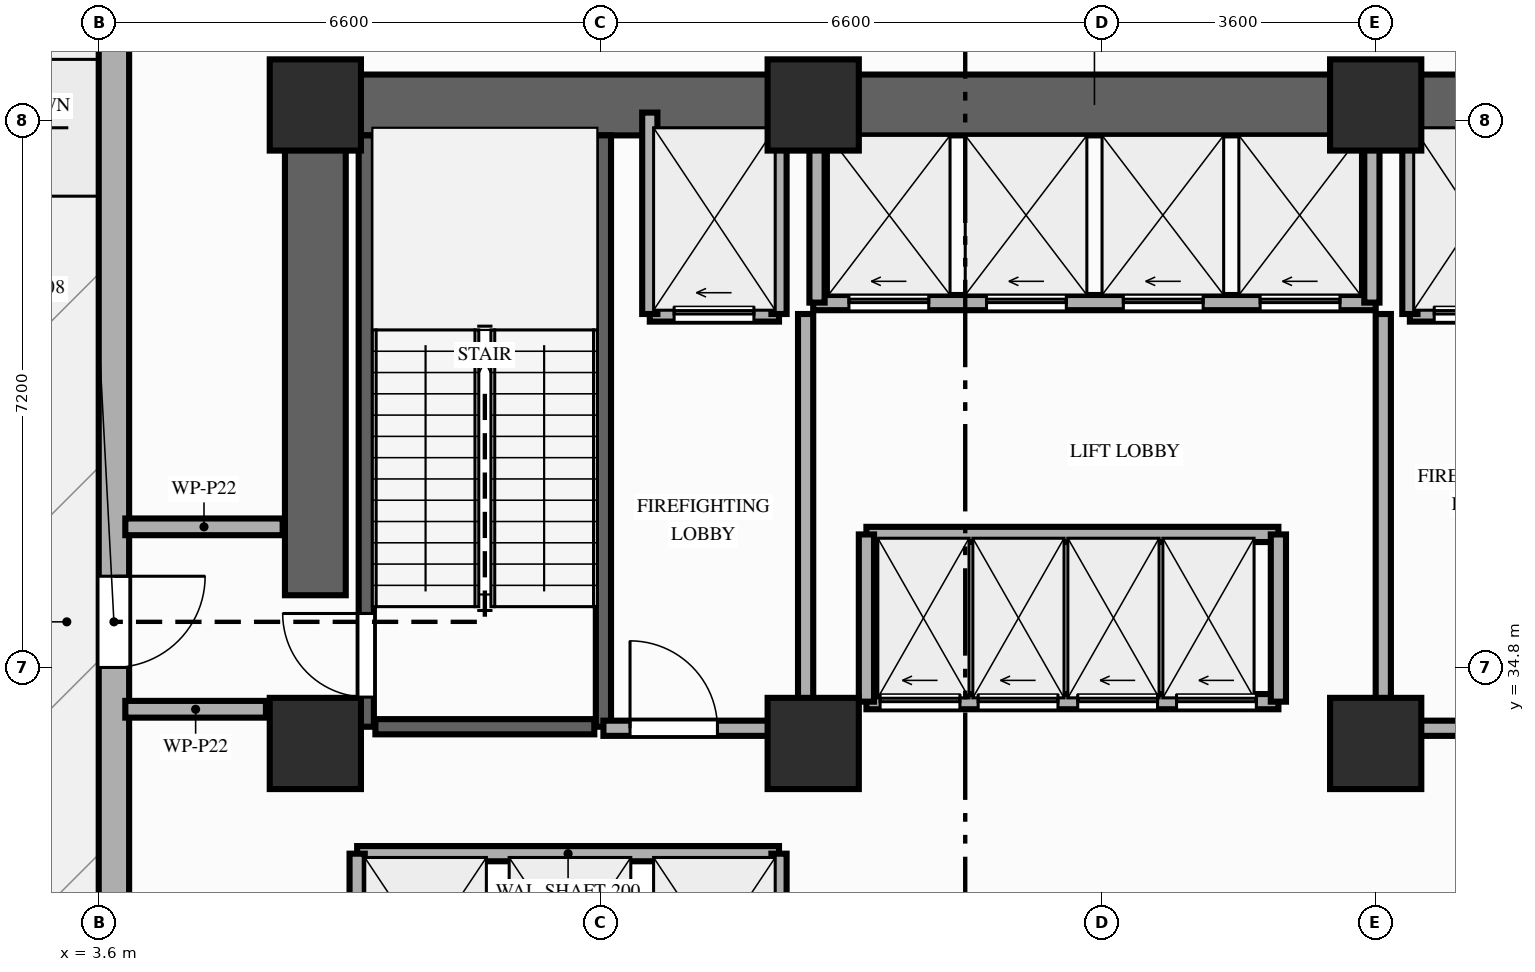
"""IFC4 building model, lengths in metres.
Left out: names, types, materials, properties, quantities, classifications, styles, units other than length and angle.
Written with IfcOpenShell. Run it as: python <this file> out.ifc"""

import sys

from ifc_helpers import new_model, si_unit, direction, frame, frame_2d, origin, origin_2d, place, context, subcontext, project, spatial, rectangle, extrude, element, fill, save


model = new_model("IFC4")
c1 = context("Model", 3, precision=1e-05, world=origin(), true_north=direction((0.0, 1.0)))
c2 = subcontext(c1, "Body", "Model", "MODEL_VIEW")
j1 = project(units=[si_unit("LENGTHUNIT", "METRE"), si_unit("PLANEANGLEUNIT", "RADIAN")], contexts=[c1])
p1 = place(None, origin())
s1 = spatial("IfcSite", under=j1, at=p1, CompositionType="ELEMENT")
p2 = place(p1, origin())
s2 = spatial("IfcBuilding", under=s1, at=p2, CompositionType="ELEMENT")
p3 = place(p2, origin())
s3 = spatial("IfcBuildingStorey", under=s2, at=p3, CompositionType="ELEMENT", Elevation=0.0)
for number, where, z_axis, x_axis in (
    (1, (6.45, 33.8, 0.0), (0.0, 0.0, 1.0), (1.0, 0.0, 0.0)),
    (2, (13.0, 33.8, 0.0), (0.0, 0.0, 1.0), (1.0, 0.0, 0.0)),
    (3, (20.4, 33.8, 0.0), (0.0, 0.0, 1.0), (1.0, 0.0, 0.0)),
    (4, (6.45, 42.2, 0.0), (0.0, 0.0, 1.0), (1.0, 0.0, 0.0)),
    (5, (13.0, 42.2, 0.0), (0.0, 0.0, 1.0), (1.0, 0.0, 0.0)),
    (6, (20.4, 42.2, 0.0), (0.0, 0.0, 1.0), (1.0, 0.0, 0.0)),
):
    element("IfcColumn", number, at=place(p3, frame(where, z_axis=z_axis, x_axis=x_axis)), inside=s3, PredefinedType="COLUMN", context=c2, shape_type="SweptSolid", body=[
        extrude(rectangle(XDim=1.2, YDim=1.2, at=origin_2d()), origin(), (0.0, 0.0, 1.0), 4.6),
    ])
p4 = place(p3, frame((3.8, 48.8, 0.0), z_axis=(0.0, 0.0, 1.0), x_axis=(0.0, -1.0, 0.0)))
e7 = element("IfcWall", 7, at=p4, inside=s3, PredefinedType="STANDARD", context=c2, shape_type="SweptSolid", body=[
    extrude(rectangle(XDim=46.0, YDim=0.4, at=frame_2d((23.0, 0.0))), origin(), (0.0, 0.0, 1.0), 3.83),
])
p5 = place(p4, frame((27.45, 0.0, 0.0)))
e8 = element("IfcOpeningElement", 8, at=p5, cuts=e7, PredefinedType="OPENING", context=c2, shape_type="SweptSolid", body=[
    extrude(rectangle(XDim=2.4, YDim=2.5, at=frame_2d((1.2, 1.25))), frame((0.0, 0.21, 0.0), z_axis=(0.0, -1.0, 0.0), x_axis=(1.0, 0.0, 0.0)), (0.0, 0.0, 1.0), 0.42),
])
p6 = place(p4, frame((33.3, 0.0, 0.0)))
e9 = element("IfcOpeningElement", 9, at=p6, cuts=e7, PredefinedType="OPENING", context=c2, shape_type="SweptSolid", body=[
    extrude(rectangle(XDim=1.2, YDim=2.2, at=frame_2d((0.6, 1.1))), frame((0.0, 0.21, 0.0), z_axis=(0.0, -1.0, 0.0), x_axis=(1.0, 0.0, 0.0)), (0.0, 0.0, 1.0), 0.42),
])
p7 = place(p4, frame((12.8, 0.0, 0.0)))
e10 = element("IfcOpeningElement", 10, at=p7, cuts=e7, PredefinedType="OPENING", context=c2, shape_type="SweptSolid", body=[
    extrude(rectangle(XDim=1.2, YDim=2.2, at=frame_2d((0.6, 1.1))), frame((0.0, 0.21, 0.0), z_axis=(0.0, -1.0, 0.0), x_axis=(1.0, 0.0, 0.0)), (0.0, 0.0, 1.0), 0.42),
])
p8 = place(p3, frame((6.45, 42.2, 0.0), z_axis=(0.0, 0.0, 1.0), x_axis=(1.0, 0.0, 0.0)))
e11 = element("IfcWall", 11, at=p8, inside=s3, PredefinedType="SHEAR", context=c2, shape_type="SweptSolid", body=[
    extrude(rectangle(XDim=20.45, YDim=0.8, at=frame_2d((10.225, 0.0))), origin(), (0.0, 0.0, 1.0), 4.35),
])
p9 = place(p3, frame((6.45, 35.75, 0.0), z_axis=(0.0, 0.0, 1.0), x_axis=(0.0, 1.0, 0.0)))
e12 = element("IfcWall", 12, at=p9, inside=s3, PredefinedType="SHEAR", context=c2, shape_type="SweptSolid", body=[
    extrude(rectangle(XDim=6.0, YDim=0.8, at=frame_2d((3.0, 0.0))), origin(), (0.0, 0.0, 1.0), 4.35),
])
p10 = place(p3, frame((7.12, 34.02, 0.0), z_axis=(0.0, 0.0, 1.0), x_axis=(0.0, 1.0, 0.0)))
e13 = element("IfcWall", 13, at=p10, inside=s3, PredefinedType="SHEAR", context=c2, shape_type="SweptSolid", body=[
    extrude(rectangle(XDim=7.78, YDim=0.2, at=frame_2d((3.89, 0.0))), origin(), (0.0, 0.0, 1.0), 4.35),
])
p11 = place(p10, frame((0.39, 0.0, 0.0)))
e14 = element("IfcOpeningElement", 14, at=p11, cuts=e13, PredefinedType="OPENING", context=c2, shape_type="SweptSolid", body=[
    extrude(rectangle(XDim=1.1, YDim=2.15, at=frame_2d((0.55, 1.075))), frame((0.0, 0.11, 0.0), z_axis=(0.0, -1.0, 0.0), x_axis=(1.0, 0.0, 0.0)), (0.0, 0.0, 1.0), 0.22),
])
p12 = place(p3, frame((10.24, 34.02, 0.0), z_axis=(0.0, 0.0, 1.0), x_axis=(0.0, 1.0, 0.0)))
e15 = element("IfcWall", 15, at=p12, inside=s3, PredefinedType="SHEAR", context=c2, shape_type="SweptSolid", body=[
    extrude(rectangle(XDim=7.78, YDim=0.2, at=frame_2d((3.89, 0.0))), origin(), (0.0, 0.0, 1.0), 4.35),
])
p13 = place(p3, frame((7.24, 34.02, 0.0), z_axis=(0.0, 0.0, 1.0), x_axis=(1.0, 0.0, 0.0)))
e16 = element("IfcWall", 16, at=p13, inside=s3, PredefinedType="SHEAR", context=c2, shape_type="SweptSolid", body=[
    extrude(rectangle(XDim=2.88, YDim=0.2, at=frame_2d((1.44, 0.0))), origin(), (0.0, 0.0, 1.0), 4.35),
])
p14 = place(p3, frame((7.0, 32.35, 0.0), z_axis=(0.0, 0.0, 1.0), x_axis=(1.0, 0.0, 0.0)))
e17 = element("IfcWall", 17, at=p14, inside=s3, PredefinedType="MOVABLE", context=c2, shape_type="SweptSolid", body=[
    extrude(rectangle(XDim=5.55, YDim=0.2, at=frame_2d((2.775, 0.0))), origin(), (0.0, 0.0, 1.0), 4.35),
])
for number, where, z_axis, x_axis in (
    (18, (7.0, 29.85, 0.0), (0.0, 0.0, 1.0), (0.0, 1.0, 0.0)),
    (19, (12.55, 29.85, 0.0), (0.0, 0.0, 1.0), (0.0, 1.0, 0.0)),
):
    element("IfcWall", number, at=place(p3, frame(where, z_axis=z_axis, x_axis=x_axis)), inside=s3, PredefinedType="MOVABLE", context=c2, shape_type="SweptSolid", body=[
        extrude(rectangle(XDim=2.5, YDim=0.2, at=frame_2d((1.25, 0.0))), origin(), (0.0, 0.0, 1.0), 4.35),
    ])
p15 = place(p3, frame((10.85, 39.45, 0.0), z_axis=(0.0, 0.0, 1.0), x_axis=(1.0, 0.0, 0.0)))
e20 = element("IfcWall", 20, at=p15, inside=s3, PredefinedType="MOVABLE", context=c2, shape_type="SweptSolid", body=[
    extrude(rectangle(XDim=1.7, YDim=0.2, at=frame_2d((0.85, 0.0))), origin(), (0.0, 0.0, 1.0), 4.35),
])
p16 = place(p15, frame((0.32, 0.0, 0.0)))
e21 = element("IfcOpeningElement", 21, at=p16, cuts=e20, PredefinedType="OPENING", context=c2, shape_type="SweptSolid", body=[
    extrude(rectangle(XDim=1.05, YDim=2.15, at=frame_2d((0.525, 1.075))), frame((0.0, 0.11, 0.0), z_axis=(0.0, -1.0, 0.0), x_axis=(1.0, 0.0, 0.0)), (0.0, 0.0, 1.0), 0.22),
])
p17 = place(p3, frame((20.85, 39.45, 0.0), z_axis=(0.0, 0.0, 1.0), x_axis=(1.0, 0.0, 0.0)))
e22 = element("IfcWall", 22, at=p17, inside=s3, PredefinedType="MOVABLE", context=c2, shape_type="SweptSolid", body=[
    extrude(rectangle(XDim=1.7, YDim=0.2, at=frame_2d((0.85, 0.0))), origin(), (0.0, 0.0, 1.0), 4.35),
])
p18 = place(p17, frame((0.32, 0.0, 0.0)))
e23 = element("IfcOpeningElement", 23, at=p18, cuts=e22, PredefinedType="OPENING", context=c2, shape_type="SweptSolid", body=[
    extrude(rectangle(XDim=1.05, YDim=2.15, at=frame_2d((0.525, 1.075))), frame((0.0, 0.11, 0.0), z_axis=(0.0, -1.0, 0.0), x_axis=(1.0, 0.0, 0.0)), (0.0, 0.0, 1.0), 0.22),
])
for number, where, z_axis, x_axis in (
    (24, (10.85, 39.45, 0.0), (0.0, 0.0, 1.0), (0.0, 1.0, 0.0)),
    (25, (12.55, 39.45, 0.0), (0.0, 0.0, 1.0), (0.0, 1.0, 0.0)),
):
    element("IfcWall", number, at=place(p3, frame(where, z_axis=z_axis, x_axis=x_axis)), inside=s3, PredefinedType="MOVABLE", context=c2, shape_type="SweptSolid", body=[
        extrude(rectangle(XDim=2.65, YDim=0.2, at=frame_2d((1.325, 0.0))), origin(), (0.0, 0.0, 1.0), 4.35),
    ])
p19 = place(p3, frame((12.9, 34.0, 0.0), z_axis=(0.0, 0.0, 1.0), x_axis=(0.0, 1.0, 0.0)))
e26 = element("IfcWall", 26, at=p19, inside=s3, PredefinedType="PARTITIONING", context=c2, shape_type="SweptSolid", body=[
    extrude(rectangle(XDim=5.45, YDim=0.2, at=frame_2d((2.725, 0.0))), origin(), (0.0, 0.0, 1.0), 3.63),
])
p20 = place(p3, frame((10.24, 34.0, 0.0), z_axis=(0.0, 0.0, 1.0), x_axis=(1.0, 0.0, 0.0)))
e27 = element("IfcWall", 27, at=p20, inside=s3, PredefinedType="PARTITIONING", context=c2, shape_type="SweptSolid", body=[
    extrude(rectangle(XDim=2.66, YDim=0.2, at=frame_2d((1.33, 0.0))), origin(), (0.0, 0.0, 1.0), 3.63),
])
p21 = place(p20, frame((0.35, 0.0, 0.0)))
e28 = element("IfcOpeningElement", 28, at=p21, cuts=e27, PredefinedType="OPENING", context=c2, shape_type="SweptSolid", body=[
    extrude(rectangle(XDim=1.15, YDim=2.15, at=frame_2d((0.575, 1.075))), frame((0.0, 0.11, 0.0), z_axis=(0.0, -1.0, 0.0), x_axis=(1.0, 0.0, 0.0)), (0.0, 0.0, 1.0), 0.22),
])
p22 = place(p3, frame((20.85, 39.45, 0.0), z_axis=(0.0, 0.0, 1.0), x_axis=(0.0, 1.0, 0.0)))
e29 = element("IfcWall", 29, at=p22, inside=s3, PredefinedType="MOVABLE", context=c2, shape_type="SweptSolid", body=[
    extrude(rectangle(XDim=2.65, YDim=0.2, at=frame_2d((1.325, 0.0))), origin(), (0.0, 0.0, 1.0), 4.35),
])
p23 = place(p3, frame((20.5, 34.0, 0.0), z_axis=(0.0, 0.0, 1.0), x_axis=(0.0, 1.0, 0.0)))
e30 = element("IfcWall", 30, at=p23, inside=s3, PredefinedType="PARTITIONING", context=c2, shape_type="SweptSolid", body=[
    extrude(rectangle(XDim=5.45, YDim=0.2, at=frame_2d((2.725, 0.0))), origin(), (0.0, 0.0, 1.0), 3.63),
])
p24 = place(p3, frame((20.5, 34.0, 0.0), z_axis=(0.0, 0.0, 1.0), x_axis=(1.0, 0.0, 0.0)))
e31 = element("IfcWall", 31, at=p24, inside=s3, PredefinedType="PARTITIONING", context=c2, shape_type="SweptSolid", body=[
    extrude(rectangle(XDim=2.6, YDim=0.2, at=frame_2d((1.3, 0.0))), origin(), (0.0, 0.0, 1.0), 3.63),
])
p25 = place(p24, frame((1.05, 0.0, 0.0)))
e32 = element("IfcOpeningElement", 32, at=p25, cuts=e31, PredefinedType="OPENING", context=c2, shape_type="SweptSolid", body=[
    extrude(rectangle(XDim=1.15, YDim=2.15, at=frame_2d((0.575, 1.075))), frame((0.0, 0.11, 0.0), z_axis=(0.0, -1.0, 0.0), x_axis=(1.0, 0.0, 0.0)), (0.0, 0.0, 1.0), 0.22),
])
p26 = place(p3, frame((13.0, 39.6, 0.0), z_axis=(0.0, 0.0, 1.0), x_axis=(1.0, 0.0, 0.0)))
e33 = element("IfcWall", 33, at=p26, inside=s3, PredefinedType="MOVABLE", context=c2, shape_type="SweptSolid", body=[
    extrude(rectangle(XDim=7.4, YDim=0.2, at=frame_2d((3.7, 0.0))), origin(), (0.0, 0.0, 1.0), 4.35),
])
p27 = place(p26, frame((0.47, 0.0, 0.0)))
e34 = element("IfcOpeningElement", 34, at=p27, cuts=e33, PredefinedType="OPENING", context=c2, shape_type="SweptSolid", body=[
    extrude(rectangle(XDim=1.05, YDim=2.15, at=frame_2d((0.525, 1.075))), frame((0.0, 0.11, 0.0), z_axis=(0.0, -1.0, 0.0), x_axis=(1.0, 0.0, 0.0)), (0.0, 0.0, 1.0), 0.22),
])
p28 = place(p26, frame((2.28, 0.0, 0.0)))
e35 = element("IfcOpeningElement", 35, at=p28, cuts=e33, PredefinedType="OPENING", context=c2, shape_type="SweptSolid", body=[
    extrude(rectangle(XDim=1.05, YDim=2.15, at=frame_2d((0.525, 1.075))), frame((0.0, 0.11, 0.0), z_axis=(0.0, -1.0, 0.0), x_axis=(1.0, 0.0, 0.0)), (0.0, 0.0, 1.0), 0.22),
])
p29 = place(p26, frame((4.08, 0.0, 0.0)))
e36 = element("IfcOpeningElement", 36, at=p29, cuts=e33, PredefinedType="OPENING", context=c2, shape_type="SweptSolid", body=[
    extrude(rectangle(XDim=1.05, YDim=2.15, at=frame_2d((0.525, 1.075))), frame((0.0, 0.11, 0.0), z_axis=(0.0, -1.0, 0.0), x_axis=(1.0, 0.0, 0.0)), (0.0, 0.0, 1.0), 0.22),
])
p30 = place(p26, frame((5.88, 0.0, 0.0)))
e37 = element("IfcOpeningElement", 37, at=p30, cuts=e33, PredefinedType="OPENING", context=c2, shape_type="SweptSolid", body=[
    extrude(rectangle(XDim=1.05, YDim=2.15, at=frame_2d((0.525, 1.075))), frame((0.0, 0.11, 0.0), z_axis=(0.0, -1.0, 0.0), x_axis=(1.0, 0.0, 0.0)), (0.0, 0.0, 1.0), 0.22),
])
for number, where, z_axis, x_axis in (
    (38, (13.05, 39.6, 0.0), (0.0, 0.0, 1.0), (0.0, 1.0, 0.0)),
    (39, (20.35, 39.6, 0.0), (0.0, 0.0, 1.0), (0.0, 1.0, 0.0)),
):
    element("IfcWall", number, at=place(p3, frame(where, z_axis=z_axis, x_axis=x_axis)), inside=s3, PredefinedType="MOVABLE", context=c2, shape_type="SweptSolid", body=[
        extrude(rectangle(XDim=2.18, YDim=0.2, at=frame_2d((1.09, 0.0))), origin(), (0.0, 0.0, 1.0), 4.35),
    ])
p31 = place(p3, frame((13.7, 34.35, 0.0), z_axis=(0.0, 0.0, 1.0), x_axis=(1.0, 0.0, 0.0)))
e40 = element("IfcWall", 40, at=p31, inside=s3, PredefinedType="MOVABLE", context=c2, shape_type="SweptSolid", body=[
    extrude(rectangle(XDim=5.42, YDim=0.2, at=frame_2d((2.71, 0.0))), origin(), (0.0, 0.0, 1.0), 4.35),
])
p32 = place(p31, frame((0.18, 0.0, 0.0)))
e41 = element("IfcOpeningElement", 41, at=p32, cuts=e40, PredefinedType="OPENING", context=c2, shape_type="SweptSolid", body=[
    extrude(rectangle(XDim=1.05, YDim=2.15, at=frame_2d((0.525, 1.075))), frame((0.0, 0.11, 0.0), z_axis=(0.0, -1.0, 0.0), x_axis=(1.0, 0.0, 0.0)), (0.0, 0.0, 1.0), 0.22),
])
p33 = place(p31, frame((1.47, 0.0, 0.0)))
e42 = element("IfcOpeningElement", 42, at=p33, cuts=e40, PredefinedType="OPENING", context=c2, shape_type="SweptSolid", body=[
    extrude(rectangle(XDim=1.05, YDim=2.15, at=frame_2d((0.525, 1.075))), frame((0.0, 0.11, 0.0), z_axis=(0.0, -1.0, 0.0), x_axis=(1.0, 0.0, 0.0)), (0.0, 0.0, 1.0), 0.22),
])
p34 = place(p31, frame((2.78, 0.0, 0.0)))
e43 = element("IfcOpeningElement", 43, at=p34, cuts=e40, PredefinedType="OPENING", context=c2, shape_type="SweptSolid", body=[
    extrude(rectangle(XDim=1.05, YDim=2.15, at=frame_2d((0.525, 1.075))), frame((0.0, 0.11, 0.0), z_axis=(0.0, -1.0, 0.0), x_axis=(1.0, 0.0, 0.0)), (0.0, 0.0, 1.0), 0.22),
])
p35 = place(p31, frame((4.08, 0.0, 0.0)))
e44 = element("IfcOpeningElement", 44, at=p35, cuts=e40, PredefinedType="OPENING", context=c2, shape_type="SweptSolid", body=[
    extrude(rectangle(XDim=1.05, YDim=2.15, at=frame_2d((0.525, 1.075))), frame((0.0, 0.11, 0.0), z_axis=(0.0, -1.0, 0.0), x_axis=(1.0, 0.0, 0.0)), (0.0, 0.0, 1.0), 0.22),
])
p36 = place(p3, frame((13.7, 36.55, 0.0), z_axis=(0.0, 0.0, 1.0), x_axis=(1.0, 0.0, 0.0)))
e45 = element("IfcWall", 45, at=p36, inside=s3, PredefinedType="MOVABLE", context=c2, shape_type="SweptSolid", body=[
    extrude(rectangle(XDim=5.42, YDim=0.2, at=frame_2d((2.71, 0.0))), origin(), (0.0, 0.0, 1.0), 4.35),
])
for number, where, z_axis, x_axis in (
    (46, (13.7, 34.35, 0.0), (0.0, 0.0, 1.0), (0.0, 1.0, 0.0)),
    (47, (19.12, 34.35, 0.0), (0.0, 0.0, 1.0), (0.0, 1.0, 0.0)),
):
    element("IfcWall", number, at=place(p3, frame(where, z_axis=z_axis, x_axis=x_axis)), inside=s3, PredefinedType="MOVABLE", context=c2, shape_type="SweptSolid", body=[
        extrude(rectangle(XDim=2.2, YDim=0.2, at=frame_2d((1.1, 0.0))), origin(), (0.0, 0.0, 1.0), 4.35),
    ])
p37 = place(p3, frame((3.95, 34.25, 0.0), z_axis=(0.0, 0.0, 1.0), x_axis=(1.0, 0.0, 0.0)))
e48 = element("IfcWall", 48, at=p37, inside=s3, PredefinedType="PARTITIONING", context=c2, shape_type="SweptSolid", body=[
    extrude(rectangle(XDim=1.85, YDim=0.22, at=frame_2d((0.925, 0.0))), origin(), (0.0, 0.0, 1.0), 4.35),
])
p38 = place(p3, frame((3.95, 36.65, 0.0), z_axis=(0.0, 0.0, 1.0), x_axis=(1.0, 0.0, 0.0)))
e49 = element("IfcWall", 49, at=p38, inside=s3, PredefinedType="PARTITIONING", context=c2, shape_type="SweptSolid", body=[
    extrude(rectangle(XDim=2.07, YDim=0.22, at=frame_2d((1.035, 0.0))), origin(), (0.0, 0.0, 1.0), 4.35),
])
p39 = place(p7, frame((1.2, 0.0, 0.0), z_axis=(0.0, 0.0, 1.0), x_axis=(-1.0, 0.0, 0.0)))
e50 = element("IfcDoor", 50, at=p39, inside=s3, OperationType="SINGLE_SWING_LEFT", PredefinedType="DOOR", context=c2, shape_type="SweptSolid", body=[
    extrude(rectangle(XDim=1.2, YDim=2.2, at=frame_2d((0.6, 1.1))), frame((0.0, 0.025, 0.0), z_axis=(0.0, -1.0, 0.0), x_axis=(1.0, 0.0, 0.0)), (0.0, 0.0, 1.0), 0.05),
])
fill(e10, e50)
p40 = place(p11, origin())
e51 = element("IfcDoor", 51, at=p40, inside=s3, OperationType="SINGLE_SWING_RIGHT", PredefinedType="DOOR", context=c2, shape_type="SweptSolid", body=[
    extrude(rectangle(XDim=1.1, YDim=2.15, at=frame_2d((0.55, 1.075))), frame((0.0, 0.025, 0.0), z_axis=(0.0, -1.0, 0.0), x_axis=(1.0, 0.0, 0.0)), (0.0, 0.0, 1.0), 0.05),
])
fill(e14, e51)
p41 = place(p16, origin())
e52 = element("IfcDoor", 52, at=p41, inside=s3, OperationType="SLIDING_TO_LEFT", PredefinedType="DOOR", context=c2, shape_type="SweptSolid", body=[
    extrude(rectangle(XDim=1.05, YDim=2.15, at=frame_2d((0.525, 1.075))), frame((0.0, 0.025, 0.0), z_axis=(0.0, -1.0, 0.0), x_axis=(1.0, 0.0, 0.0)), (0.0, 0.0, 1.0), 0.05),
])
fill(e21, e52)
p42 = place(p18, origin())
e53 = element("IfcDoor", 53, at=p42, inside=s3, OperationType="SLIDING_TO_LEFT", PredefinedType="DOOR", context=c2, shape_type="SweptSolid", body=[
    extrude(rectangle(XDim=1.05, YDim=2.15, at=frame_2d((0.525, 1.075))), frame((0.0, 0.025, 0.0), z_axis=(0.0, -1.0, 0.0), x_axis=(1.0, 0.0, 0.0)), (0.0, 0.0, 1.0), 0.05),
])
fill(e23, e53)
p43 = place(p21, origin())
e54 = element("IfcDoor", 54, at=p43, inside=s3, OperationType="SINGLE_SWING_LEFT", PredefinedType="DOOR", context=c2, shape_type="SweptSolid", body=[
    extrude(rectangle(XDim=1.15, YDim=2.15, at=frame_2d((0.575, 1.075))), frame((0.0, 0.025, 0.0), z_axis=(0.0, -1.0, 0.0), x_axis=(1.0, 0.0, 0.0)), (0.0, 0.0, 1.0), 0.05),
])
fill(e28, e54)
p44 = place(p27, origin())
e55 = element("IfcDoor", 55, at=p44, inside=s3, OperationType="SLIDING_TO_LEFT", PredefinedType="DOOR", context=c2, shape_type="SweptSolid", body=[
    extrude(rectangle(XDim=1.05, YDim=2.15, at=frame_2d((0.525, 1.075))), frame((0.0, 0.025, 0.0), z_axis=(0.0, -1.0, 0.0), x_axis=(1.0, 0.0, 0.0)), (0.0, 0.0, 1.0), 0.05),
])
fill(e34, e55)
p45 = place(p28, origin())
e56 = element("IfcDoor", 56, at=p45, inside=s3, OperationType="SLIDING_TO_LEFT", PredefinedType="DOOR", context=c2, shape_type="SweptSolid", body=[
    extrude(rectangle(XDim=1.05, YDim=2.15, at=frame_2d((0.525, 1.075))), frame((0.0, 0.025, 0.0), z_axis=(0.0, -1.0, 0.0), x_axis=(1.0, 0.0, 0.0)), (0.0, 0.0, 1.0), 0.05),
])
fill(e35, e56)
p46 = place(p29, origin())
e57 = element("IfcDoor", 57, at=p46, inside=s3, OperationType="SLIDING_TO_LEFT", PredefinedType="DOOR", context=c2, shape_type="SweptSolid", body=[
    extrude(rectangle(XDim=1.05, YDim=2.15, at=frame_2d((0.525, 1.075))), frame((0.0, 0.025, 0.0), z_axis=(0.0, -1.0, 0.0), x_axis=(1.0, 0.0, 0.0)), (0.0, 0.0, 1.0), 0.05),
])
fill(e36, e57)
p47 = place(p30, origin())
e58 = element("IfcDoor", 58, at=p47, inside=s3, OperationType="SLIDING_TO_LEFT", PredefinedType="DOOR", context=c2, shape_type="SweptSolid", body=[
    extrude(rectangle(XDim=1.05, YDim=2.15, at=frame_2d((0.525, 1.075))), frame((0.0, 0.025, 0.0), z_axis=(0.0, -1.0, 0.0), x_axis=(1.0, 0.0, 0.0)), (0.0, 0.0, 1.0), 0.05),
])
fill(e37, e58)
p48 = place(p32, origin())
e59 = element("IfcDoor", 59, at=p48, inside=s3, OperationType="SLIDING_TO_LEFT", PredefinedType="DOOR", context=c2, shape_type="SweptSolid", body=[
    extrude(rectangle(XDim=1.05, YDim=2.15, at=frame_2d((0.525, 1.075))), frame((0.0, 0.025, 0.0), z_axis=(0.0, -1.0, 0.0), x_axis=(1.0, 0.0, 0.0)), (0.0, 0.0, 1.0), 0.05),
])
fill(e41, e59)
p49 = place(p33, origin())
e60 = element("IfcDoor", 60, at=p49, inside=s3, OperationType="SLIDING_TO_LEFT", PredefinedType="DOOR", context=c2, shape_type="SweptSolid", body=[
    extrude(rectangle(XDim=1.05, YDim=2.15, at=frame_2d((0.525, 1.075))), frame((0.0, 0.025, 0.0), z_axis=(0.0, -1.0, 0.0), x_axis=(1.0, 0.0, 0.0)), (0.0, 0.0, 1.0), 0.05),
])
fill(e42, e60)
p50 = place(p34, origin())
e61 = element("IfcDoor", 61, at=p50, inside=s3, OperationType="SLIDING_TO_LEFT", PredefinedType="DOOR", context=c2, shape_type="SweptSolid", body=[
    extrude(rectangle(XDim=1.05, YDim=2.15, at=frame_2d((0.525, 1.075))), frame((0.0, 0.025, 0.0), z_axis=(0.0, -1.0, 0.0), x_axis=(1.0, 0.0, 0.0)), (0.0, 0.0, 1.0), 0.05),
])
fill(e43, e61)
p51 = place(p35, origin())
e62 = element("IfcDoor", 62, at=p51, inside=s3, OperationType="SLIDING_TO_LEFT", PredefinedType="DOOR", context=c2, shape_type="SweptSolid", body=[
    extrude(rectangle(XDim=1.05, YDim=2.15, at=frame_2d((0.525, 1.075))), frame((0.0, 0.025, 0.0), z_axis=(0.0, -1.0, 0.0), x_axis=(1.0, 0.0, 0.0)), (0.0, 0.0, 1.0), 0.05),
])
fill(e44, e62)
save(model, sys.argv[1])
